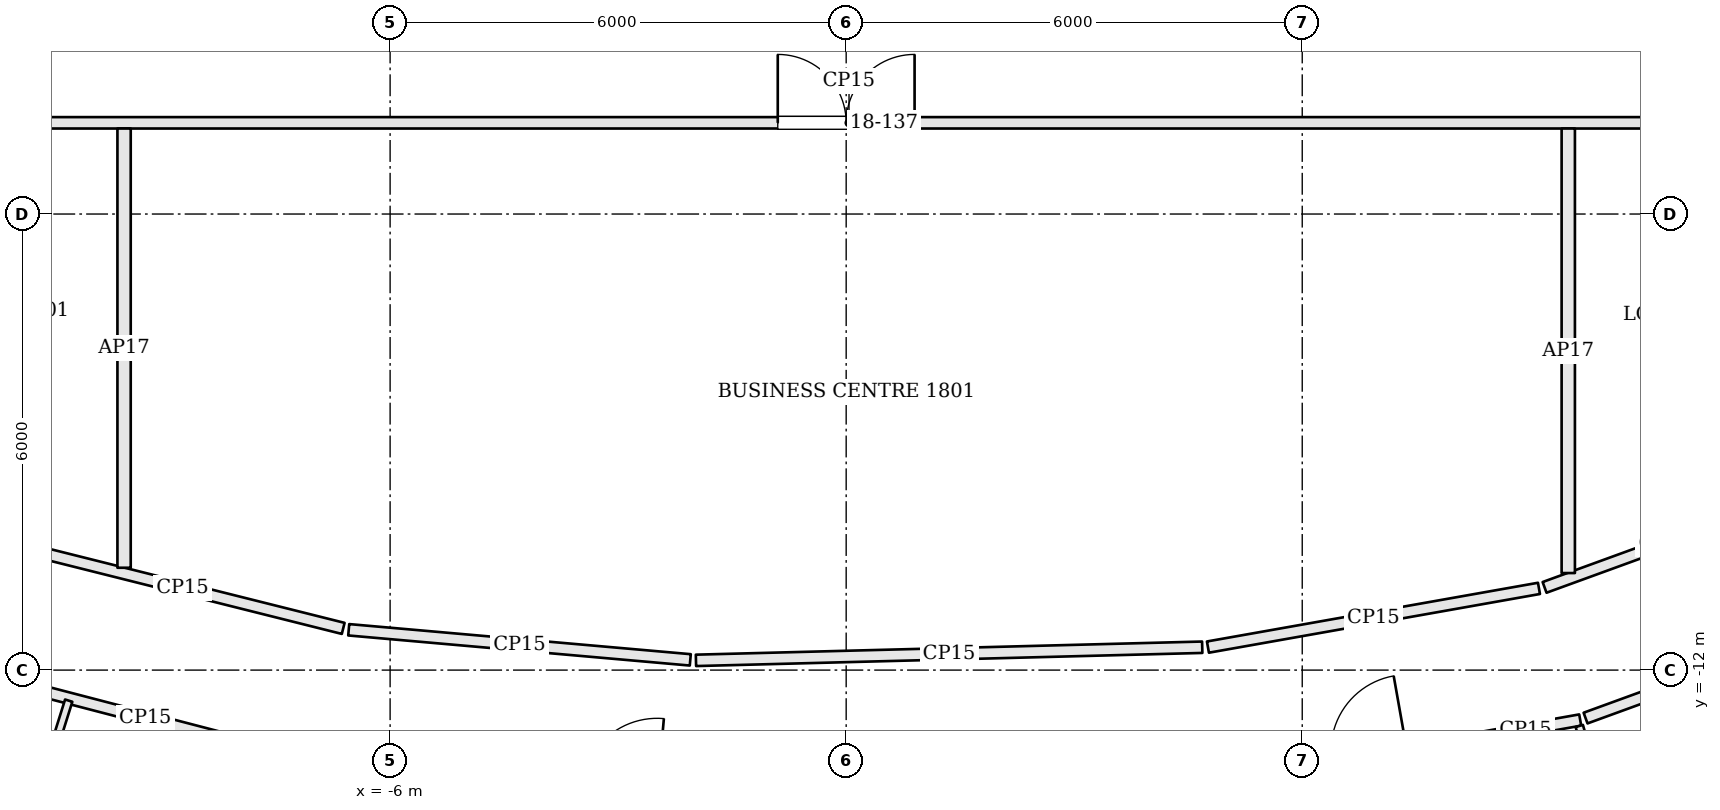
"""IFC4 building model, lengths in metres.
Left out: names, types, materials, properties, quantities, classifications, styles, units other than length and angle.
Written with IfcOpenShell. Run it as: python <this file> out.ifc"""

import sys

from ifc_helpers import new_model, si_unit, direction, frame, frame_2d, origin, place, context, subcontext, project, spatial, rectangle, extrude, element, fill, save


model = new_model("IFC4")
c1 = context("Model", 3, precision=1e-05, world=origin(), true_north=direction((0.0, 1.0)))
c2 = subcontext(c1, "Body", "Model", "MODEL_VIEW")
j1 = project(units=[si_unit("LENGTHUNIT", "METRE"), si_unit("PLANEANGLEUNIT", "RADIAN")], contexts=[c1])
p1 = place(None, origin())
s1 = spatial("IfcSite", under=j1, at=p1, CompositionType="ELEMENT")
p2 = place(p1, origin())
s2 = spatial("IfcBuilding", under=s1, at=p2, CompositionType="ELEMENT")
p3 = place(p2, frame((0.0, 0.0, 81.6)))
s3 = spatial("IfcBuildingStorey", under=s2, at=p3, CompositionType="ELEMENT", Elevation=81.6)
p4 = place(p3, frame((-11.595, -12.012, 0.0), z_axis=(0.0, 0.0, 1.0), x_axis=(0.967696436642, -0.252118239146, 0.0)))
e1 = element("IfcWall", 1, at=p4, inside=s3, PredefinedType="PARTITIONING", context=c2, shape_type="SweptSolid", body=[
    extrude(rectangle(XDim=4.91, YDim=0.15, at=frame_2d((2.455, 0.0))), origin(), (0.0, 0.0, 1.0), 2.784),
])
p5 = place(p3, frame((8.221, -12.912, 0.0), z_axis=(0.0, 0.0, 1.0), x_axis=(0.984645082055, 0.174568216995, 0.0)))
e2 = element("IfcWall", 2, at=p5, inside=s3, PredefinedType="PARTITIONING", context=c2, shape_type="SweptSolid", body=[
    extrude(rectangle(XDim=1.459, YDim=0.15, at=frame_2d((0.729, 0.0))), origin(), (0.0, 0.0, 1.0), 2.784),
])
p6 = place(p3, frame((9.728, -12.631, 0.0), z_axis=(0.0, 0.0, 1.0), x_axis=(0.939626438181, 0.342201923826, 0.0)))
e3 = element("IfcWall", 3, at=p6, inside=s3, PredefinedType="PARTITIONING", context=c2, shape_type="SweptSolid", body=[
    extrude(rectangle(XDim=3.716, YDim=0.15, at=frame_2d((1.858, 0.0))), origin(), (0.0, 0.0, 1.0), 2.784),
])
p7 = place(p3, frame((12.353, -9.76, 0.0), z_axis=(0.0, 0.0, 1.0), x_axis=(-0.939632450309, -0.342185415127, 0.0)))
e4 = element("IfcWall", 4, at=p7, inside=s3, PredefinedType="PARTITIONING", context=c2, shape_type="SweptSolid", body=[
    extrude(rectangle(XDim=3.368, YDim=0.15, at=frame_2d((1.684, 0.0))), origin(), (0.0, 0.0, 1.0), 2.784),
])
p8 = place(p3, frame((9.115, -10.925, 0.0), z_axis=(0.0, 0.0, 1.0), x_axis=(-0.984632605417, -0.174638576352, 0.0)))
e5 = element("IfcWall", 5, at=p8, inside=s3, PredefinedType="PARTITIONING", context=c2, shape_type="SweptSolid", body=[
    extrude(rectangle(XDim=4.423, YDim=0.15, at=frame_2d((2.211, 0.0))), origin(), (0.0, 0.0, 1.0), 2.784),
])
p9 = place(p3, frame((4.684, -11.699, 0.0), z_axis=(0.0, 0.0, 1.0), x_axis=(-0.999663438204, -0.025942442425, 0.0)))
e6 = element("IfcWall", 6, at=p9, inside=s3, PredefinedType="PARTITIONING", context=c2, shape_type="SweptSolid", body=[
    extrude(rectangle(XDim=6.663, YDim=0.15, at=frame_2d((3.332, 0.0))), origin(), (0.0, 0.0, 1.0), 2.784),
])
p10 = place(p3, frame((-2.051, -11.865, 0.0), z_axis=(0.0, 0.0, 1.0), x_axis=(-0.996139599493, 0.087783246245, 0.0)))
e7 = element("IfcWall", 7, at=p10, inside=s3, PredefinedType="PARTITIONING", context=c2, shape_type="SweptSolid", body=[
    extrude(rectangle(XDim=4.511, YDim=0.15, at=frame_2d((2.255, 0.0))), origin(), (0.0, 0.0, 1.0), 2.784),
])
p11 = place(p3, frame((-6.617, -11.451, 0.0), z_axis=(0.0, 0.0, 1.0), x_axis=(-0.969987441267, 0.243155020069, 0.0)))
e8 = element("IfcWall", 8, at=p11, inside=s3, PredefinedType="PARTITIONING", context=c2, shape_type="SweptSolid", body=[
    extrude(rectangle(XDim=4.359, YDim=0.15, at=frame_2d((2.179, 0.0))), origin(), (0.0, 0.0, 1.0), 2.784),
])
p12 = place(p3, frame((-14.725, -4.8, 0.0), z_axis=(0.0, 0.0, 1.0), x_axis=(1.0, 0.0, 0.0)))
e9 = element("IfcWall", 9, at=p12, inside=s3, PredefinedType="PARTITIONING", context=c2, shape_type="SweptSolid", body=[
    extrude(rectangle(XDim=29.525, YDim=0.15, at=frame_2d((14.763, 0.0))), origin(), (0.0, 0.0, 1.0), 2.784),
])
p13 = place(p12, frame((13.825, 0.0, 0.0)))
e10 = element("IfcOpeningElement", 10, at=p13, cuts=e9, PredefinedType="OPENING", context=c2, shape_type="SweptSolid", body=[
    extrude(rectangle(XDim=1.8, YDim=2.1, at=frame_2d((0.9, 1.05))), frame((0.0, 0.085, 0.0), z_axis=(0.0, -1.0, 0.0), x_axis=(1.0, 0.0, 0.0)), (0.0, 0.0, 1.0), 0.17),
])
p14 = place(p3, frame((-10.229, -12.402, 0.0), z_axis=(0.0, 0.0, 1.0), x_axis=(-0.299899842135, -0.95397069383, 0.0)))
e11 = element("IfcWall", 11, at=p14, inside=s3, PredefinedType="PARTITIONING", context=c2, shape_type="SweptSolid", body=[
    extrude(rectangle(XDim=2.6, YDim=0.1, at=frame_2d((1.3, 0.0))), origin(), (0.0, 0.0, 1.0), 2.784),
])
p15 = place(p14, frame((1.3, 0.0, 0.0)))
e12 = element("IfcOpeningElement", 12, at=p15, cuts=e11, PredefinedType="OPENING", context=c2, shape_type="SweptSolid", body=[
    extrude(rectangle(XDim=0.8, YDim=2.1, at=frame_2d((0.4, 1.05))), frame((0.0, 0.06, 0.0), z_axis=(0.0, -1.0, 0.0), x_axis=(1.0, 0.0, 0.0)), (0.0, 0.0, 1.0), 0.12),
])
p16 = place(p3, frame((9.645, -12.735, 0.0), z_axis=(0.0, 0.0, 1.0), x_axis=(0.27694262008, -0.960886458008, 0.0)))
e13 = element("IfcWall", 13, at=p16, inside=s3, PredefinedType="PARTITIONING", context=c2, shape_type="SweptSolid", body=[
    extrude(rectangle(XDim=2.525, YDim=0.1, at=frame_2d((1.262, 0.0))), origin(), (0.0, 0.0, 1.0), 2.784),
])
p17 = place(p16, frame((1.2, 0.0, 0.0)))
e14 = element("IfcOpeningElement", 14, at=p17, cuts=e13, PredefinedType="OPENING", context=c2, shape_type="SweptSolid", body=[
    extrude(rectangle(XDim=0.8, YDim=2.1, at=frame_2d((0.4, 1.05))), frame((0.0, 0.06, 0.0), z_axis=(0.0, -1.0, 0.0), x_axis=(1.0, 0.0, 0.0)), (0.0, 0.0, 1.0), 0.12),
])
p18 = place(p3, frame((-9.5, -10.654, 0.0), z_axis=(0.0, 0.0, 1.0), x_axis=(0.0, 1.0, 0.0)))
e15 = element("IfcWall", 15, at=p18, inside=s3, PredefinedType="PARTITIONING", context=c2, shape_type="SweptSolid", body=[
    extrude(rectangle(XDim=5.779, YDim=0.175, at=frame_2d((2.889, 0.0))), origin(), (0.0, 0.0, 1.0), 2.784),
])
p19 = place(p3, frame((9.5, -10.723, 0.0), z_axis=(0.0, 0.0, 1.0), x_axis=(0.0, 1.0, 0.0)))
e16 = element("IfcWall", 16, at=p19, inside=s3, PredefinedType="PARTITIONING", context=c2, shape_type="SweptSolid", body=[
    extrude(rectangle(XDim=5.848, YDim=0.175, at=frame_2d((2.924, 0.0))), origin(), (0.0, 0.0, 1.0), 2.784),
])
p20 = place(p13, origin())
e17 = element("IfcDoor", 17, at=p20, inside=s3, OperationType="DOUBLE_DOOR_SINGLE_SWING", PredefinedType="DOOR", context=c2, shape_type="SweptSolid", body=[
    extrude(rectangle(XDim=1.8, YDim=2.1, at=frame_2d((0.9, 1.05))), frame((0.0, 0.025, 0.0), z_axis=(0.0, -1.0, 0.0), x_axis=(1.0, 0.0, 0.0)), (0.0, 0.0, 1.0), 0.05),
])
fill(e10, e17)
save(model, sys.argv[1])
